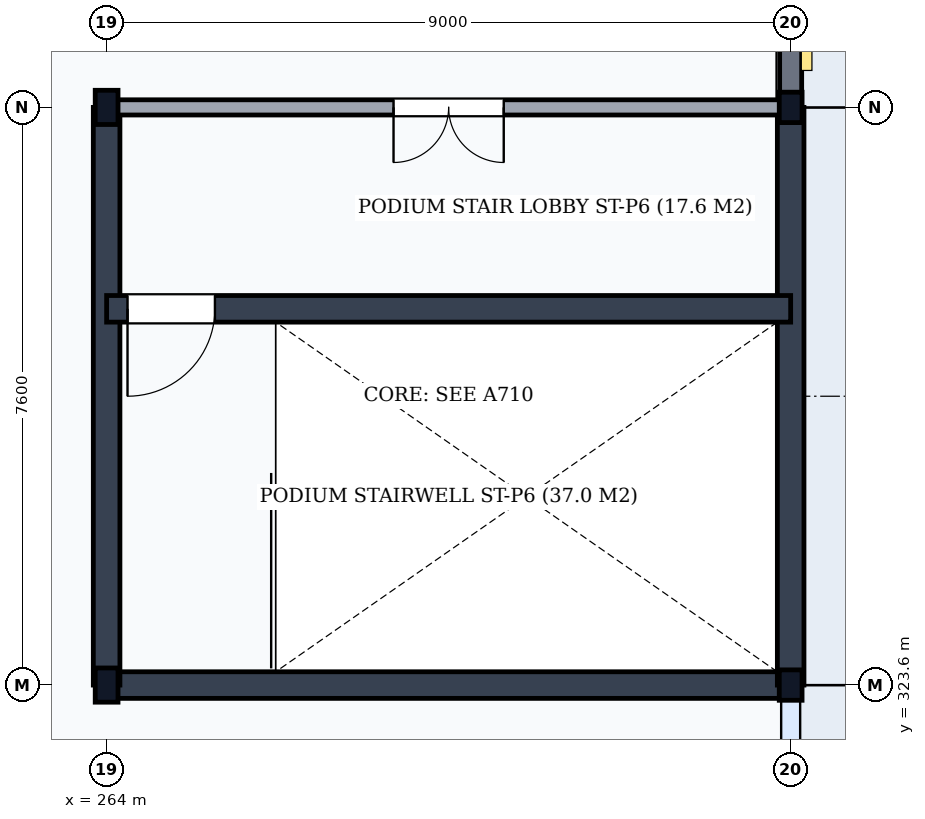
"""IFC4 building model, lengths in metres.
Left out: names, types, materials, properties, quantities, classifications, styles, units other than length and angle.
Written with IfcOpenShell. Run it as: python <this file> out.ifc"""

import sys

from ifc_helpers import new_model, si_unit, direction, frame, frame_2d, origin, origin_2d, place, context, subcontext, project, spatial, rectangle, i_section, extrude, element, fill, save


model = new_model("IFC4")
c1 = context("Model", 3, precision=1e-05, world=origin(), true_north=direction((0.0, 1.0)))
c2 = subcontext(c1, "Body", "Model", "MODEL_VIEW")
j1 = project(units=[si_unit("LENGTHUNIT", "METRE"), si_unit("PLANEANGLEUNIT", "RADIAN")], contexts=[c1])
p1 = place(None, origin())
s1 = spatial("IfcSite", under=j1, at=p1, CompositionType="ELEMENT")
p2 = place(p1, origin())
s2 = spatial("IfcBuilding", under=s1, at=p2, CompositionType="ELEMENT")
p3 = place(p2, frame((0.0, 0.0, 5.4)))
s3 = spatial("IfcBuildingStorey", under=s2, at=p3, CompositionType="ELEMENT", Elevation=5.4)
for number, where, z_axis, x_axis in (
    (1, (264.0, 323.6, 0.0), (0.0, 0.0, 1.0), (1.0, 0.0, 0.0)),
    (2, (264.0, 331.2, 0.0), (0.0, 0.0, 1.0), (1.0, 0.0, 0.0)),
):
    element("IfcColumn", number, at=place(p3, frame(where, z_axis=z_axis, x_axis=x_axis)), inside=s3, PredefinedType="COLUMN", context=c2, shape_type="SweptSolid", body=[
        extrude(i_section(OverallWidth=0.3, OverallDepth=0.45, WebThickness=0.014, FlangeThickness=0.026, FilletRadius=0.027, at=origin_2d()), origin(), (0.0, 0.0, 1.0), 5.1),
    ])
for number, where, z_axis, x_axis in (
    (3, (273.0, 323.6, 0.0), (0.0, 0.0, 1.0), (1.0, 0.0, 0.0)),
    (4, (273.0, 331.2, 0.0), (0.0, 0.0, 1.0), (1.0, 0.0, 0.0)),
):
    element("IfcColumn", number, at=place(p3, frame(where, z_axis=z_axis, x_axis=x_axis)), inside=s3, PredefinedType="COLUMN", context=c2, shape_type="SweptSolid", body=[
        extrude(i_section(OverallWidth=0.3, OverallDepth=0.4, WebThickness=0.013, FlangeThickness=0.024, FilletRadius=0.027, at=origin_2d()), origin(), (0.0, 0.0, 1.0), 5.1),
    ])
p4 = place(p3, frame((273.0, 331.206, 0.0), z_axis=(0.0, 0.0, 1.0), x_axis=(0.0, 1.0, 0.0)))
e5 = element("IfcWall", 5, at=p4, inside=s3, PredefinedType="SOLIDWALL", context=c2, shape_type="SweptSolid", body=[
    extrude(rectangle(XDim=6.788, YDim=0.29, at=frame_2d((3.394, 0.0))), origin(), (0.0, 0.0, 1.0), 4.618),
])
p5 = place(p4, frame((2.594, 0.0, 0.95)))
e6 = element("IfcOpeningElement", 6, at=p5, cuts=e5, PredefinedType="OPENING", context=c2, shape_type="SweptSolid", body=[
    extrude(rectangle(XDim=1.6, YDim=2.4, at=frame_2d((0.8, 1.2))), frame((0.0, 0.16, 0.0), z_axis=(0.0, -1.0, 0.0), x_axis=(1.0, 0.0, 0.0)), (0.0, 0.0, 1.0), 0.32),
])
p6 = place(p3, frame((272.9, 323.8, 5.1), z_axis=(0.0, 0.0, 1.0), x_axis=(0.0, 1.0, 0.0)))
e7 = element("IfcWall", 7, at=p6, inside=s3, PredefinedType="PARAPET", context=c2, shape_type="SweptSolid", body=[
    extrude(rectangle(XDim=14.0, YDim=0.18, at=frame_2d((7.0, 0.0))), origin(), (0.0, 0.0, 1.0), 1.2),
])
p7 = place(p3, frame((264.0, 323.6, 0.0), z_axis=(0.0, 0.0, 1.0), x_axis=(1.0, 0.0, 0.0)))
e8 = element("IfcWall", 8, at=p7, inside=s3, PredefinedType="SHEAR", context=c2, shape_type="SweptSolid", body=[
    extrude(rectangle(XDim=9.0, YDim=0.35, at=frame_2d((4.5, 0.0))), origin(), (0.0, 0.0, 1.0), 4.85),
])
for number, where, z_axis, x_axis in (
    (9, (264.0, 323.6, 0.0), (0.0, 0.0, 1.0), (0.0, 1.0, 0.0)),
    (10, (273.0, 323.6, 0.0), (0.0, 0.0, 1.0), (0.0, 1.0, 0.0)),
):
    element("IfcWall", number, at=place(p3, frame(where, z_axis=z_axis, x_axis=x_axis)), inside=s3, PredefinedType="SHEAR", context=c2, shape_type="SweptSolid", body=[
        extrude(rectangle(XDim=7.6, YDim=0.35, at=frame_2d((3.8, 0.0))), origin(), (0.0, 0.0, 1.0), 4.85),
    ])
p8 = place(p3, frame((264.0, 328.55, 0.0), z_axis=(0.0, 0.0, 1.0), x_axis=(1.0, 0.0, 0.0)))
e11 = element("IfcWall", 11, at=p8, inside=s3, PredefinedType="SHEAR", context=c2, shape_type="SweptSolid", body=[
    extrude(rectangle(XDim=9.0, YDim=0.35, at=frame_2d((4.5, 0.0))), origin(), (0.0, 0.0, 1.0), 4.85),
])
p9 = place(p8, frame((0.275, 0.0, 0.0)))
e12 = element("IfcOpeningElement", 12, at=p9, cuts=e11, PredefinedType="OPENING", context=c2, shape_type="SweptSolid", body=[
    extrude(rectangle(XDim=1.15, YDim=2.15, at=frame_2d((0.575, 1.075))), frame((0.0, 0.19, 0.0), z_axis=(0.0, -1.0, 0.0), x_axis=(1.0, 0.0, 0.0)), (0.0, 0.0, 1.0), 0.38),
])
p10 = place(p3, frame((264.0, 331.2, 0.0), z_axis=(0.0, 0.0, 1.0), x_axis=(1.0, 0.0, 0.0)))
e13 = element("IfcWall", 13, at=p10, inside=s3, PredefinedType="PARTITIONING", context=c2, shape_type="SweptSolid", body=[
    extrude(rectangle(XDim=9.0, YDim=0.2, at=frame_2d((4.5, 0.0))), origin(), (0.0, 0.0, 1.0), 4.298),
])
p11 = place(p10, frame((3.775, 0.0, 0.0)))
e14 = element("IfcOpeningElement", 14, at=p11, cuts=e13, PredefinedType="OPENING", context=c2, shape_type="SweptSolid", body=[
    extrude(rectangle(XDim=1.45, YDim=2.2, at=frame_2d((0.725, 1.1))), frame((0.0, 0.115, 0.0), z_axis=(0.0, -1.0, 0.0), x_axis=(1.0, 0.0, 0.0)), (0.0, 0.0, 1.0), 0.23),
])
p12 = place(p9, frame((1.15, 0.0, 0.0), z_axis=(0.0, 0.0, 1.0), x_axis=(-1.0, 0.0, 0.0)))
e15 = element("IfcDoor", 15, at=p12, inside=s3, OperationType="SINGLE_SWING_RIGHT", PredefinedType="DOOR", context=c2, shape_type="SweptSolid", body=[
    extrude(rectangle(XDim=1.15, YDim=2.15, at=frame_2d((0.575, 1.075))), frame((0.0, 0.025, 0.0), z_axis=(0.0, -1.0, 0.0), x_axis=(1.0, 0.0, 0.0)), (0.0, 0.0, 1.0), 0.05),
])
fill(e12, e15)
p13 = place(p11, frame((1.45, 0.0, 0.0), z_axis=(0.0, 0.0, 1.0), x_axis=(-1.0, 0.0, 0.0)))
e16 = element("IfcDoor", 16, at=p13, inside=s3, OperationType="DOUBLE_DOOR_SINGLE_SWING", PredefinedType="DOOR", context=c2, shape_type="SweptSolid", body=[
    extrude(rectangle(XDim=1.45, YDim=2.2, at=frame_2d((0.725, 1.1))), frame((0.0, 0.025, 0.0), z_axis=(0.0, -1.0, 0.0), x_axis=(1.0, 0.0, 0.0)), (0.0, 0.0, 1.0), 0.05),
])
fill(e14, e16)
save(model, sys.argv[1])
